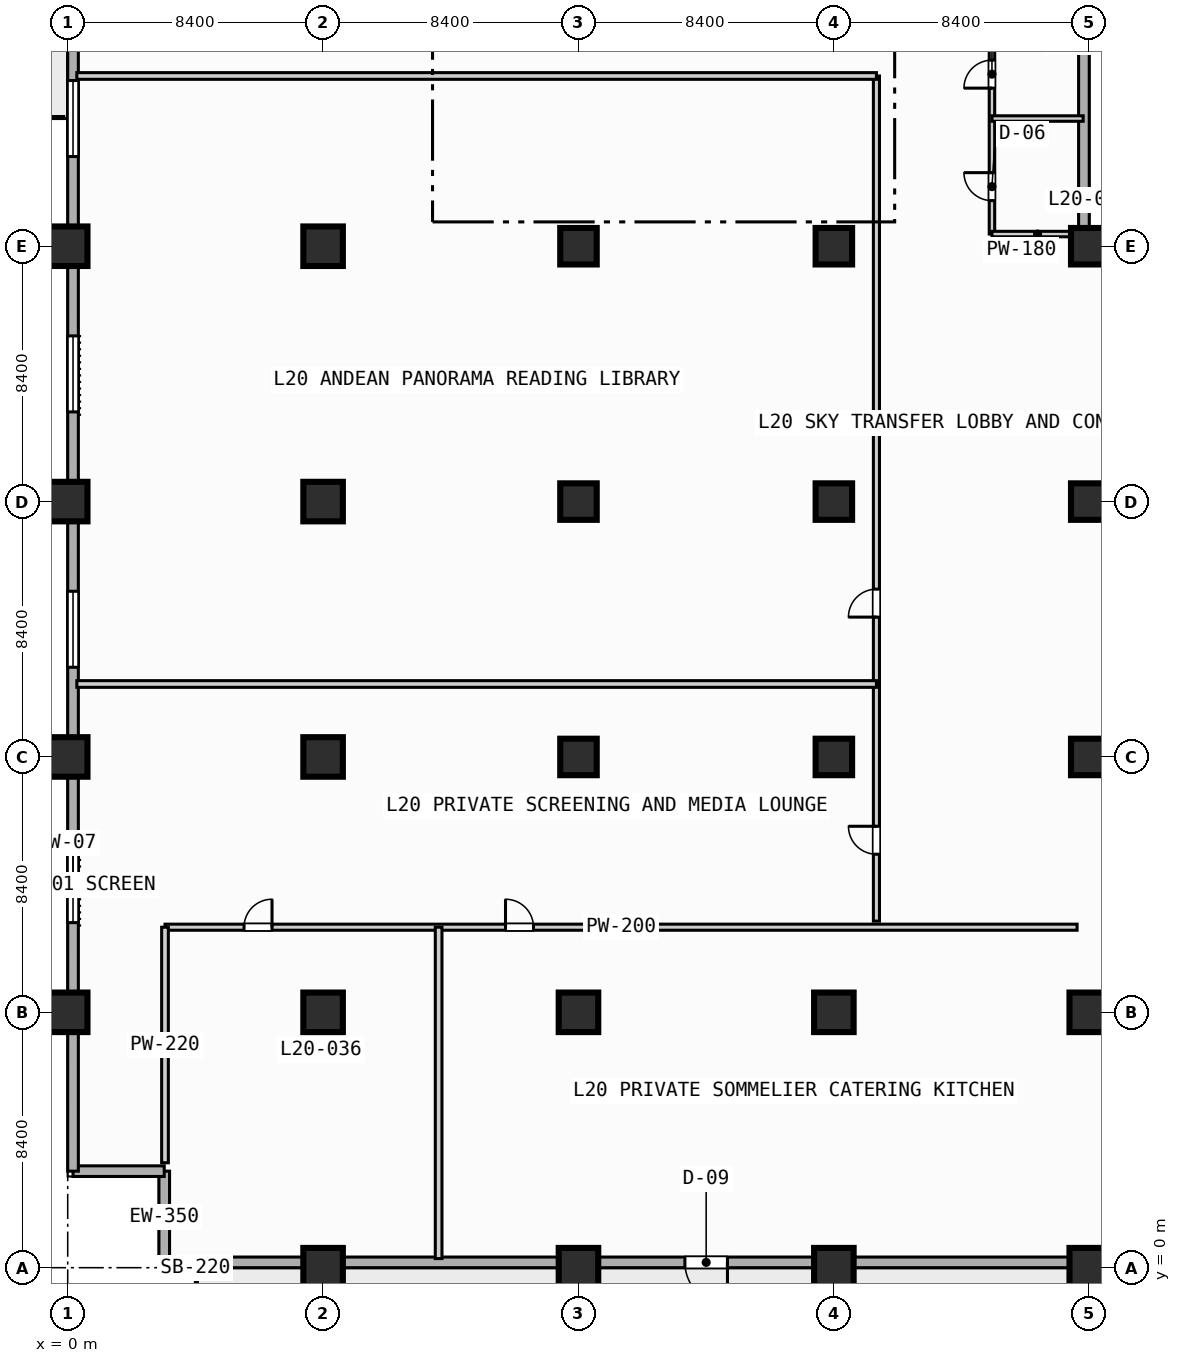
"""IFC4 building model, lengths in metres.
Left out: names, types, materials, properties, quantities, classifications, styles, units other than length and angle.
Written with IfcOpenShell. Run it as: python <this file> out.ifc"""

import sys

from ifc_helpers import new_model, si_unit, direction, frame, frame_2d, origin, origin_2d, place, context, subcontext, project, spatial, rectangle, extrude, element, fill, save


model = new_model("IFC4")
c1 = context("Model", 3, precision=1e-05, world=origin(), true_north=direction((0.0, 1.0)))
c2 = subcontext(c1, "Body", "Model", "MODEL_VIEW")
j1 = project(units=[si_unit("LENGTHUNIT", "METRE"), si_unit("PLANEANGLEUNIT", "RADIAN")], contexts=[c1])
p1 = place(None, origin())
s1 = spatial("IfcSite", under=j1, at=p1, CompositionType="ELEMENT")
p2 = place(p1, origin())
s2 = spatial("IfcBuilding", under=s1, at=p2, CompositionType="ELEMENT")
p3 = place(p2, frame((0.0, 0.0, 85.2)))
s3 = spatial("IfcBuildingStorey", under=s2, at=p3, CompositionType="ELEMENT", Elevation=85.2)
for number, where, z_axis, x_axis in (
    (1, (0.0, 8.4, 0.0), (0.0, 0.0, 1.0), (1.0, 0.0, 0.0)),
    (2, (0.0, 16.8, 0.0), (0.0, 0.0, 1.0), (1.0, 0.0, 0.0)),
    (3, (0.0, 25.2, 0.0), (0.0, 0.0, 1.0), (1.0, 0.0, 0.0)),
    (4, (0.0, 33.6, 0.0), (0.0, 0.0, 1.0), (1.0, 0.0, 0.0)),
    (5, (8.4, 0.0, 0.0), (0.0, 0.0, 1.0), (1.0, 0.0, 0.0)),
    (6, (8.4, 8.4, 0.0), (0.0, 0.0, 1.0), (1.0, 0.0, 0.0)),
    (7, (8.4, 16.8, 0.0), (0.0, 0.0, 1.0), (1.0, 0.0, 0.0)),
    (8, (8.4, 25.2, 0.0), (0.0, 0.0, 1.0), (1.0, 0.0, 0.0)),
    (9, (8.4, 33.6, 0.0), (0.0, 0.0, 1.0), (1.0, 0.0, 0.0)),
    (10, (16.8, 0.0, 0.0), (0.0, 0.0, 1.0), (1.0, 0.0, 0.0)),
    (11, (16.8, 8.4, 0.0), (0.0, 0.0, 1.0), (1.0, 0.0, 0.0)),
):
    element("IfcColumn", number, at=place(p3, frame(where, z_axis=z_axis, x_axis=x_axis)), inside=s3, PredefinedType="COLUMN", context=c2, shape_type="SweptSolid", body=[
        extrude(rectangle(XDim=1.3, YDim=1.3, at=origin_2d()), origin(), (0.0, 0.0, 1.0), 4.4),
    ])
for number, where, z_axis, x_axis in (
    (12, (16.8, 16.8, 0.0), (0.0, 0.0, 1.0), (1.0, 0.0, 0.0)),
    (13, (16.8, 25.2, 0.0), (0.0, 0.0, 1.0), (1.0, 0.0, 0.0)),
    (14, (16.8, 33.6, 0.0), (0.0, 0.0, 1.0), (1.0, 0.0, 0.0)),
):
    element("IfcColumn", number, at=place(p3, frame(where, z_axis=z_axis, x_axis=x_axis)), inside=s3, PredefinedType="COLUMN", context=c2, shape_type="SweptSolid", body=[
        extrude(rectangle(XDim=1.2, YDim=1.2, at=origin_2d()), origin(), (0.0, 0.0, 1.0), 4.4),
    ])
for number, where, z_axis, x_axis in (
    (15, (25.2, 0.0, 0.0), (0.0, 0.0, 1.0), (1.0, 0.0, 0.0)),
    (16, (25.2, 8.4, 0.0), (0.0, 0.0, 1.0), (1.0, 0.0, 0.0)),
):
    element("IfcColumn", number, at=place(p3, frame(where, z_axis=z_axis, x_axis=x_axis)), inside=s3, PredefinedType="COLUMN", context=c2, shape_type="SweptSolid", body=[
        extrude(rectangle(XDim=1.3, YDim=1.3, at=origin_2d()), origin(), (0.0, 0.0, 1.0), 4.4),
    ])
for number, where, z_axis, x_axis in (
    (17, (25.2, 16.8, 0.0), (0.0, 0.0, 1.0), (1.0, 0.0, 0.0)),
    (18, (25.2, 25.2, 0.0), (0.0, 0.0, 1.0), (1.0, 0.0, 0.0)),
    (19, (25.2, 33.6, 0.0), (0.0, 0.0, 1.0), (1.0, 0.0, 0.0)),
):
    element("IfcColumn", number, at=place(p3, frame(where, z_axis=z_axis, x_axis=x_axis)), inside=s3, PredefinedType="COLUMN", context=c2, shape_type="SweptSolid", body=[
        extrude(rectangle(XDim=1.2, YDim=1.2, at=origin_2d()), origin(), (0.0, 0.0, 1.0), 4.4),
    ])
for number, where, z_axis, x_axis in (
    (20, (33.6, 0.0, 0.0), (0.0, 0.0, 1.0), (1.0, 0.0, 0.0)),
    (21, (33.6, 8.4, 0.0), (0.0, 0.0, 1.0), (1.0, 0.0, 0.0)),
):
    element("IfcColumn", number, at=place(p3, frame(where, z_axis=z_axis, x_axis=x_axis)), inside=s3, PredefinedType="COLUMN", context=c2, shape_type="SweptSolid", body=[
        extrude(rectangle(XDim=1.3, YDim=1.3, at=origin_2d()), origin(), (0.0, 0.0, 1.0), 4.4),
    ])
for number, where, z_axis, x_axis in (
    (22, (33.6, 16.8, 0.0), (0.0, 0.0, 1.0), (1.0, 0.0, 0.0)),
    (23, (33.6, 25.2, 0.0), (0.0, 0.0, 1.0), (1.0, 0.0, 0.0)),
    (24, (33.6, 33.6, 0.0), (0.0, 0.0, 1.0), (1.0, 0.0, 0.0)),
):
    element("IfcColumn", number, at=place(p3, frame(where, z_axis=z_axis, x_axis=x_axis)), inside=s3, PredefinedType="COLUMN", context=c2, shape_type="SweptSolid", body=[
        extrude(rectangle(XDim=1.2, YDim=1.2, at=origin_2d()), origin(), (0.0, 0.0, 1.0), 4.4),
    ])
for number, where, z_axis, x_axis in (
    (25, (3.175, 0.175, 0.0), (0.0, 0.0, 1.0), (0.0, 1.0, 0.0)),
    (26, (3.175, 3.175, 0.0), (0.0, 0.0, 1.0), (-1.0, 0.0, 0.0)),
):
    element("IfcWall", number, at=place(p3, frame(where, z_axis=z_axis, x_axis=x_axis)), inside=s3, PredefinedType="STANDARD", context=c2, shape_type="SweptSolid", body=[
        extrude(rectangle(XDim=3.0, YDim=0.35, at=frame_2d((1.5, 0.0))), origin(), (0.0, 0.0, 1.0), 4.15),
    ])
p4 = place(p3, frame((0.175, 3.175, 0.0), z_axis=(0.0, 0.0, 1.0), x_axis=(0.0, 1.0, 0.0)))
e27 = element("IfcWall", 27, at=p4, inside=s3, PredefinedType="STANDARD", context=c2, shape_type="SweptSolid", body=[
    extrude(rectangle(XDim=86.05, YDim=0.35, at=frame_2d((43.025, 0.0))), origin(), (0.0, 0.0, 1.0), 4.15),
])
p5 = place(p4, frame((42.325, 0.0, 0.0)))
e28 = element("IfcOpeningElement", 28, at=p5, cuts=e27, PredefinedType="OPENING", context=c2, shape_type="SweptSolid", body=[
    extrude(rectangle(XDim=1.4, YDim=2.2, at=frame_2d((0.7, 1.1))), frame((0.0, 0.185, 0.0), z_axis=(0.0, -1.0, 0.0), x_axis=(1.0, 0.0, 0.0)), (0.0, 0.0, 1.0), 0.37),
])
p6 = place(p4, frame((8.175, 0.0, 0.85)))
e29 = element("IfcOpeningElement", 29, at=p6, cuts=e27, PredefinedType="OPENING", context=c2, shape_type="SweptSolid", body=[
    extrude(rectangle(XDim=2.5, YDim=2.2, at=frame_2d((1.25, 1.1))), frame((0.0, 0.185, 0.0), z_axis=(0.0, -1.0, 0.0), x_axis=(1.0, 0.0, 0.0)), (0.0, 0.0, 1.0), 0.37),
])
p7 = place(p4, frame((16.575, 0.0, 0.85)))
e30 = element("IfcOpeningElement", 30, at=p7, cuts=e27, PredefinedType="OPENING", context=c2, shape_type="SweptSolid", body=[
    extrude(rectangle(XDim=2.5, YDim=2.2, at=frame_2d((1.25, 1.1))), frame((0.0, 0.185, 0.0), z_axis=(0.0, -1.0, 0.0), x_axis=(1.0, 0.0, 0.0)), (0.0, 0.0, 1.0), 0.37),
])
p8 = place(p4, frame((24.975, 0.0, 0.85)))
e31 = element("IfcOpeningElement", 31, at=p8, cuts=e27, PredefinedType="OPENING", context=c2, shape_type="SweptSolid", body=[
    extrude(rectangle(XDim=2.5, YDim=2.2, at=frame_2d((1.25, 1.1))), frame((0.0, 0.185, 0.0), z_axis=(0.0, -1.0, 0.0), x_axis=(1.0, 0.0, 0.0)), (0.0, 0.0, 1.0), 0.37),
])
p9 = place(p4, frame((33.375, 0.0, 0.85)))
e32 = element("IfcOpeningElement", 32, at=p9, cuts=e27, PredefinedType="OPENING", context=c2, shape_type="SweptSolid", body=[
    extrude(rectangle(XDim=2.5, YDim=2.2, at=frame_2d((1.25, 1.1))), frame((0.0, 0.185, 0.0), z_axis=(0.0, -1.0, 0.0), x_axis=(1.0, 0.0, 0.0)), (0.0, 0.0, 1.0), 0.37),
])
p10 = place(p3, frame((33.425, 89.225, 0.0), z_axis=(0.0, 0.0, 1.0), x_axis=(0.0, -1.0, 0.0)))
e33 = element("IfcWall", 33, at=p10, inside=s3, PredefinedType="STANDARD", context=c2, shape_type="SweptSolid", body=[
    extrude(rectangle(XDim=55.8, YDim=0.35, at=frame_2d((27.9, 0.0))), origin(), (0.0, 0.0, 1.0), 4.15),
])
p11 = place(p3, frame((33.425, 33.425, 0.0), z_axis=(0.0, 0.0, 1.0), x_axis=(1.0, 0.0, 0.0)))
e34 = element("IfcWall", 34, at=p11, inside=s3, PredefinedType="STANDARD", context=c2, shape_type="SweptSolid", body=[
    extrude(rectangle(XDim=39.0, YDim=0.35, at=frame_2d((19.5, 0.0))), origin(), (0.0, 0.0, 1.0), 4.15),
])
p12 = place(p11, frame((12.075, 0.0, 0.0)))
e35 = element("IfcOpeningElement", 35, at=p12, cuts=e34, PredefinedType="OPENING", context=c2, shape_type="SweptSolid", body=[
    extrude(rectangle(XDim=1.4, YDim=2.2, at=frame_2d((0.7, 1.1))), frame((0.0, 0.185, 0.0), z_axis=(0.0, -1.0, 0.0), x_axis=(1.0, 0.0, 0.0)), (0.0, 0.0, 1.0), 0.37),
])
p13 = place(p3, frame((72.425, 0.175, 0.0), z_axis=(0.0, 0.0, 1.0), x_axis=(-1.0, 0.0, 0.0)))
e36 = element("IfcWall", 36, at=p13, inside=s3, PredefinedType="STANDARD", context=c2, shape_type="SweptSolid", body=[
    extrude(rectangle(XDim=69.25, YDim=0.35, at=frame_2d((34.625, 0.0))), origin(), (0.0, 0.0, 1.0), 4.15),
])
p14 = place(p13, frame((50.725, 0.0, 0.0)))
e37 = element("IfcOpeningElement", 37, at=p14, cuts=e36, PredefinedType="OPENING", context=c2, shape_type="SweptSolid", body=[
    extrude(rectangle(XDim=1.4, YDim=2.2, at=frame_2d((0.7, 1.1))), frame((0.0, 0.185, 0.0), z_axis=(0.0, -1.0, 0.0), x_axis=(1.0, 0.0, 0.0)), (0.0, 0.0, 1.0), 0.37),
])
p15 = place(p13, frame((8.175, 0.0, 0.85)))
e38 = element("IfcOpeningElement", 38, at=p15, cuts=e36, PredefinedType="OPENING", context=c2, shape_type="SweptSolid", body=[
    extrude(rectangle(XDim=2.5, YDim=2.2, at=frame_2d((1.25, 1.1))), frame((0.0, 0.185, 0.0), z_axis=(0.0, -1.0, 0.0), x_axis=(1.0, 0.0, 0.0)), (0.0, 0.0, 1.0), 0.37),
])
p16 = place(p3, frame((30.4, 34.0, 0.0), z_axis=(0.0, 0.0, 1.0), x_axis=(0.0, 1.0, 0.0)))
e39 = element("IfcWall", 39, at=p16, inside=s3, PredefinedType="PLUMBINGWALL", context=c2, shape_type="SweptSolid", body=[
    extrude(rectangle(XDim=7.6, YDim=0.18, at=frame_2d((3.8, 0.0))), origin(), (0.0, 0.0, 1.0), 4.15),
])
p17 = place(p16, frame((1.1, 0.0, 0.0)))
e40 = element("IfcOpeningElement", 40, at=p17, cuts=e39, PredefinedType="OPENING", context=c2, shape_type="SweptSolid", body=[
    extrude(rectangle(XDim=0.92, YDim=2.1, at=frame_2d((0.46, 1.05))), frame((0.0, 0.1, 0.0), z_axis=(0.0, -1.0, 0.0), x_axis=(1.0, 0.0, 0.0)), (0.0, 0.0, 1.0), 0.2),
])
p18 = place(p16, frame((4.8, 0.0, 0.0)))
e41 = element("IfcOpeningElement", 41, at=p18, cuts=e39, PredefinedType="OPENING", context=c2, shape_type="SweptSolid", body=[
    extrude(rectangle(XDim=0.92, YDim=2.1, at=frame_2d((0.46, 1.05))), frame((0.0, 0.1, 0.0), z_axis=(0.0, -1.0, 0.0), x_axis=(1.0, 0.0, 0.0)), (0.0, 0.0, 1.0), 0.2),
])
for number, where, z_axis, x_axis in (
    (42, (30.4, 34.0, 0.0), (0.0, 0.0, 1.0), (1.0, 0.0, 0.0)),
    (43, (30.4, 37.8, 0.0), (0.0, 0.0, 1.0), (1.0, 0.0, 0.0)),
):
    element("IfcWall", number, at=place(p3, frame(where, z_axis=z_axis, x_axis=x_axis)), inside=s3, PredefinedType="PLUMBINGWALL", context=c2, shape_type="SweptSolid", body=[
        extrude(rectangle(XDim=3.0, YDim=0.18, at=frame_2d((1.5, 0.0))), origin(), (0.0, 0.0, 1.0), 4.15),
    ])
p19 = place(p3, frame((3.2, 11.2, 0.0), z_axis=(0.0, 0.0, 1.0), x_axis=(1.0, 0.0, 0.0)))
e44 = element("IfcWall", 44, at=p19, inside=s3, PredefinedType="PARTITIONING", context=c2, shape_type="SweptSolid", body=[
    extrude(rectangle(XDim=30.0, YDim=0.2, at=frame_2d((15.0, 0.0))), origin(), (0.0, 0.0, 1.0), 4.15),
])
p20 = place(p19, frame((2.6, 0.0, 0.0)))
e45 = element("IfcOpeningElement", 45, at=p20, cuts=e44, PredefinedType="OPENING", context=c2, shape_type="SweptSolid", body=[
    extrude(rectangle(XDim=0.92, YDim=2.1, at=frame_2d((0.46, 1.05))), frame((0.0, 0.11, 0.0), z_axis=(0.0, -1.0, 0.0), x_axis=(1.0, 0.0, 0.0)), (0.0, 0.0, 1.0), 0.22),
])
p21 = place(p19, frame((11.2, 0.0, 0.0)))
e46 = element("IfcOpeningElement", 46, at=p21, cuts=e44, PredefinedType="OPENING", context=c2, shape_type="SweptSolid", body=[
    extrude(rectangle(XDim=0.92, YDim=2.1, at=frame_2d((0.46, 1.05))), frame((0.0, 0.11, 0.0), z_axis=(0.0, -1.0, 0.0), x_axis=(1.0, 0.0, 0.0)), (0.0, 0.0, 1.0), 0.22),
])
p22 = place(p3, frame((3.2, 3.45, 0.0), z_axis=(0.0, 0.0, 1.0), x_axis=(0.0, 1.0, 0.0)))
e47 = element("IfcWall", 47, at=p22, inside=s3, PredefinedType="PARTITIONING", context=c2, shape_type="SweptSolid", body=[
    extrude(rectangle(XDim=7.75, YDim=0.22, at=frame_2d((3.875, 0.0))), origin(), (0.0, 0.0, 1.0), 4.15),
])
p23 = place(p3, frame((12.2, 0.3, 0.0), z_axis=(0.0, 0.0, 1.0), x_axis=(0.0, 1.0, 0.0)))
e48 = element("IfcWall", 48, at=p23, inside=s3, PredefinedType="PARTITIONING", context=c2, shape_type="SweptSolid", body=[
    extrude(rectangle(XDim=10.9, YDim=0.22, at=frame_2d((5.45, 0.0))), origin(), (0.0, 0.0, 1.0), 4.15),
])
p24 = place(p3, frame((26.6, 11.4, 0.0), z_axis=(0.0, 0.0, 1.0), x_axis=(0.0, 1.0, 0.0)))
e49 = element("IfcWall", 49, at=p24, inside=s3, PredefinedType="PARTITIONING", context=c2, shape_type="SweptSolid", body=[
    extrude(rectangle(XDim=27.8, YDim=0.2, at=frame_2d((13.9, 0.0))), origin(), (0.0, 0.0, 1.0), 4.15),
])
p25 = place(p24, frame((2.2, 0.0, 0.0)))
e50 = element("IfcOpeningElement", 50, at=p25, cuts=e49, PredefinedType="OPENING", context=c2, shape_type="SweptSolid", body=[
    extrude(rectangle(XDim=0.92, YDim=2.1, at=frame_2d((0.46, 1.05))), frame((0.0, 0.11, 0.0), z_axis=(0.0, -1.0, 0.0), x_axis=(1.0, 0.0, 0.0)), (0.0, 0.0, 1.0), 0.22),
])
p26 = place(p24, frame((10.0, 0.0, 0.0)))
e51 = element("IfcOpeningElement", 51, at=p26, cuts=e49, PredefinedType="OPENING", context=c2, shape_type="SweptSolid", body=[
    extrude(rectangle(XDim=0.92, YDim=2.1, at=frame_2d((0.46, 1.05))), frame((0.0, 0.11, 0.0), z_axis=(0.0, -1.0, 0.0), x_axis=(1.0, 0.0, 0.0)), (0.0, 0.0, 1.0), 0.22),
])
for number, where, z_axis, x_axis in (
    (52, (0.3, 19.2, 0.0), (0.0, 0.0, 1.0), (1.0, 0.0, 0.0)),
    (53, (0.3, 39.2, 0.0), (0.0, 0.0, 1.0), (1.0, 0.0, 0.0)),
):
    element("IfcWall", number, at=place(p3, frame(where, z_axis=z_axis, x_axis=x_axis)), inside=s3, PredefinedType="PARTITIONING", context=c2, shape_type="SweptSolid", body=[
        extrude(rectangle(XDim=26.3, YDim=0.22, at=frame_2d((13.15, 0.0))), origin(), (0.0, 0.0, 1.0), 4.15),
    ])
p27 = place(p6, origin())
e54 = element("IfcWindow", 54, at=p27, inside=s3, PartitioningType="SINGLE_PANEL", PredefinedType="WINDOW", context=c2, shape_type="SweptSolid", body=[
    extrude(rectangle(XDim=2.5, YDim=2.2, at=frame_2d((1.25, 1.1))), frame((0.0, 0.03, 0.0), z_axis=(0.0, -1.0, 0.0), x_axis=(1.0, 0.0, 0.0)), (0.0, 0.0, 1.0), 0.06),
])
fill(e29, e54)
p28 = place(p7, origin())
e55 = element("IfcWindow", 55, at=p28, inside=s3, PartitioningType="SINGLE_PANEL", PredefinedType="WINDOW", context=c2, shape_type="SweptSolid", body=[
    extrude(rectangle(XDim=2.5, YDim=2.2, at=frame_2d((1.25, 1.1))), frame((0.0, 0.03, 0.0), z_axis=(0.0, -1.0, 0.0), x_axis=(1.0, 0.0, 0.0)), (0.0, 0.0, 1.0), 0.06),
])
fill(e30, e55)
p29 = place(p8, origin())
e56 = element("IfcWindow", 56, at=p29, inside=s3, PartitioningType="SINGLE_PANEL", PredefinedType="WINDOW", context=c2, shape_type="SweptSolid", body=[
    extrude(rectangle(XDim=2.5, YDim=2.2, at=frame_2d((1.25, 1.1))), frame((0.0, 0.03, 0.0), z_axis=(0.0, -1.0, 0.0), x_axis=(1.0, 0.0, 0.0)), (0.0, 0.0, 1.0), 0.06),
])
fill(e31, e56)
p30 = place(p9, origin())
e57 = element("IfcWindow", 57, at=p30, inside=s3, PartitioningType="SINGLE_PANEL", PredefinedType="WINDOW", context=c2, shape_type="SweptSolid", body=[
    extrude(rectangle(XDim=2.5, YDim=2.2, at=frame_2d((1.25, 1.1))), frame((0.0, 0.03, 0.0), z_axis=(0.0, -1.0, 0.0), x_axis=(1.0, 0.0, 0.0)), (0.0, 0.0, 1.0), 0.06),
])
fill(e32, e57)
p31 = place(p14, origin())
e58 = element("IfcDoor", 58, at=p31, inside=s3, OperationType="SINGLE_SWING_LEFT", PredefinedType="DOOR", context=c2, shape_type="SweptSolid", body=[
    extrude(rectangle(XDim=1.4, YDim=2.2, at=frame_2d((0.7, 1.1))), frame((0.0, 0.025, 0.0), z_axis=(0.0, -1.0, 0.0), x_axis=(1.0, 0.0, 0.0)), (0.0, 0.0, 1.0), 0.05),
])
fill(e37, e58)
p32 = place(p17, origin())
e59 = element("IfcDoor", 59, at=p32, inside=s3, OperationType="SINGLE_SWING_RIGHT", PredefinedType="DOOR", context=c2, shape_type="SweptSolid", body=[
    extrude(rectangle(XDim=0.92, YDim=2.1, at=frame_2d((0.46, 1.05))), frame((0.0, 0.025, 0.0), z_axis=(0.0, -1.0, 0.0), x_axis=(1.0, 0.0, 0.0)), (0.0, 0.0, 1.0), 0.05),
])
fill(e40, e59)
p33 = place(p18, origin())
e60 = element("IfcDoor", 60, at=p33, inside=s3, OperationType="SINGLE_SWING_LEFT", PredefinedType="DOOR", context=c2, shape_type="SweptSolid", body=[
    extrude(rectangle(XDim=0.92, YDim=2.1, at=frame_2d((0.46, 1.05))), frame((0.0, 0.025, 0.0), z_axis=(0.0, -1.0, 0.0), x_axis=(1.0, 0.0, 0.0)), (0.0, 0.0, 1.0), 0.05),
])
fill(e41, e60)
p34 = place(p20, origin())
e61 = element("IfcDoor", 61, at=p34, inside=s3, OperationType="SINGLE_SWING_RIGHT", PredefinedType="DOOR", context=c2, shape_type="SweptSolid", body=[
    extrude(rectangle(XDim=0.92, YDim=2.1, at=frame_2d((0.46, 1.05))), frame((0.0, 0.025, 0.0), z_axis=(0.0, -1.0, 0.0), x_axis=(1.0, 0.0, 0.0)), (0.0, 0.0, 1.0), 0.05),
])
fill(e45, e61)
p35 = place(p21, origin())
e62 = element("IfcDoor", 62, at=p35, inside=s3, OperationType="SINGLE_SWING_LEFT", PredefinedType="DOOR", context=c2, shape_type="SweptSolid", body=[
    extrude(rectangle(XDim=0.92, YDim=2.1, at=frame_2d((0.46, 1.05))), frame((0.0, 0.025, 0.0), z_axis=(0.0, -1.0, 0.0), x_axis=(1.0, 0.0, 0.0)), (0.0, 0.0, 1.0), 0.05),
])
fill(e46, e62)
p36 = place(p25, origin())
e63 = element("IfcDoor", 63, at=p36, inside=s3, OperationType="SINGLE_SWING_RIGHT", PredefinedType="DOOR", context=c2, shape_type="SweptSolid", body=[
    extrude(rectangle(XDim=0.92, YDim=2.1, at=frame_2d((0.46, 1.05))), frame((0.0, 0.025, 0.0), z_axis=(0.0, -1.0, 0.0), x_axis=(1.0, 0.0, 0.0)), (0.0, 0.0, 1.0), 0.05),
])
fill(e50, e63)
p37 = place(p26, origin())
e64 = element("IfcDoor", 64, at=p37, inside=s3, OperationType="SINGLE_SWING_LEFT", PredefinedType="DOOR", context=c2, shape_type="SweptSolid", body=[
    extrude(rectangle(XDim=0.92, YDim=2.1, at=frame_2d((0.46, 1.05))), frame((0.0, 0.025, 0.0), z_axis=(0.0, -1.0, 0.0), x_axis=(1.0, 0.0, 0.0)), (0.0, 0.0, 1.0), 0.05),
])
fill(e51, e64)
save(model, sys.argv[1])
